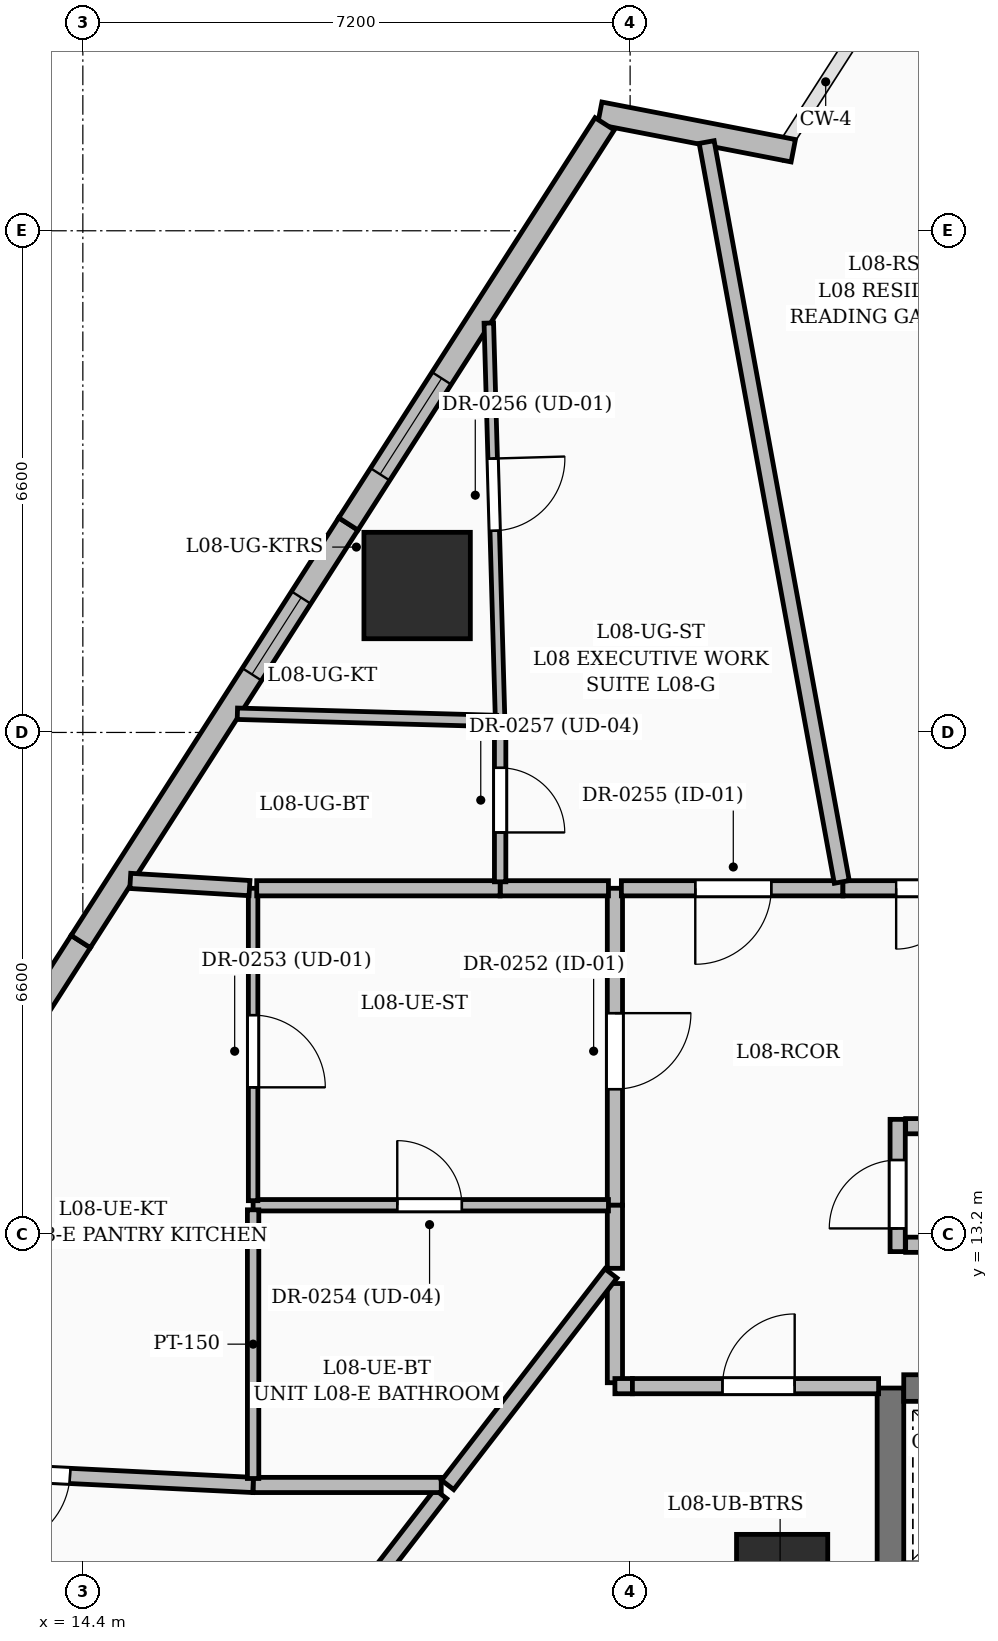
"""IFC4 building model, lengths in metres.
Left out: names, types, materials, properties, quantities, classifications, styles, units other than length and angle.
Written with IfcOpenShell. Run it as: python <this file> out.ifc"""

import sys

from ifc_helpers import new_model, si_unit, direction, frame, frame_2d, origin, origin_2d, place, context, subcontext, project, spatial, rectangle, extrude, element, fill, save


model = new_model("IFC4")
c1 = context("Model", 3, precision=1e-05, world=origin(), true_north=direction((0.0, 1.0)))
c2 = subcontext(c1, "Body", "Model", "MODEL_VIEW")
j1 = project(units=[si_unit("LENGTHUNIT", "METRE"), si_unit("PLANEANGLEUNIT", "RADIAN")], contexts=[c1])
p1 = place(None, origin())
s1 = spatial("IfcSite", under=j1, at=p1, CompositionType="ELEMENT")
p2 = place(p1, origin())
s2 = spatial("IfcBuilding", under=s1, at=p2, CompositionType="ELEMENT")
p3 = place(p2, frame((0.0, 0.0, 39.0)))
s3 = spatial("IfcBuildingStorey", under=s2, at=p3, CompositionType="ELEMENT", Elevation=39.0)
p4 = place(p3, frame((23.6, 8.65, 0.0), z_axis=(0.0, 0.0, 1.0), x_axis=(1.0, 0.0, 0.0)))
e1 = element("IfcColumn", 1, at=p4, inside=s3, PredefinedType="COLUMN", context=c2, shape_type="SweptSolid", body=[
    extrude(rectangle(XDim=1.2, YDim=1.2, at=origin_2d()), origin(), (0.0, 0.0, 1.0), 3.6),
])
p5 = place(p3, frame((25.025, 6.225, 0.0), z_axis=(0.0, 0.0, 1.0), x_axis=(0.0, 1.0, 0.0)))
e2 = element("IfcWall", 2, at=p5, inside=s3, PredefinedType="SOLIDWALL", context=c2, shape_type="SweptSolid", body=[
    extrude(rectangle(XDim=4.95, YDim=0.35, at=frame_2d((2.475, 0.0))), origin(), (0.0, 0.0, 1.0), 3.6),
])
p6 = place(p3, frame((25.2, 11.175, 0.0), z_axis=(0.0, 0.0, 1.0), x_axis=(1.0, 0.0, 0.0)))
e3 = element("IfcWall", 3, at=p6, inside=s3, PredefinedType="SOLIDWALL", context=c2, shape_type="SweptSolid", body=[
    extrude(rectangle(XDim=1.9, YDim=0.35, at=frame_2d((0.95, 0.0))), origin(), (0.0, 0.0, 1.0), 3.6),
])
p7 = place(p3, frame((18.798, 21.733, 0.0), z_axis=(0.0, 0.0, 1.0), x_axis=(1.0, 0.0, 0.0)))
e4 = element("IfcColumn", 4, at=p7, inside=s3, PredefinedType="COLUMN", context=c2, shape_type="SweptSolid", body=[
    extrude(rectangle(XDim=1.4, YDim=1.4, at=origin_2d()), origin(), (0.0, 0.0, 1.0), 3.6),
])
p8 = place(p3, frame((21.201, 27.947, 0.0), z_axis=(0.0, 0.0, 1.0), x_axis=(0.981746971615, -0.190191702567, 0.0)))
e5 = element("IfcWall", 5, at=p8, inside=s3, PredefinedType="SOLIDWALL", context=c2, shape_type="SweptSolid", body=[
    extrude(rectangle(XDim=2.593, YDim=0.3, at=frame_2d((1.296, 0.0))), origin(), (0.0, 0.0, 1.0), 2.375),
])
p9 = place(p3, frame((10.851, 11.555, 0.0), z_axis=(0.0, 0.0, 1.0), x_axis=(0.539526045631, 0.841968910403, 0.0)))
e6 = element("IfcWall", 6, at=p9, inside=s3, PredefinedType="SOLIDWALL", context=c2, shape_type="SweptSolid", body=[
    extrude(rectangle(XDim=6.526, YDim=0.3, at=frame_2d((3.263, 0.0))), origin(), (0.0, 0.0, 1.0), 3.35),
])
p10 = place(p9, frame((2.25, 0.0, 0.6)))
e7 = element("IfcOpeningElement", 7, at=p10, cuts=e6, PredefinedType="OPENING", context=c2, shape_type="SweptSolid", body=[
    extrude(rectangle(XDim=1.8, YDim=2.1, at=frame_2d((0.9, 1.05))), frame((0.0, 0.16, 0.0), z_axis=(0.0, -1.0, 0.0), x_axis=(1.0, 0.0, 0.0)), (0.0, 0.0, 1.0), 0.32),
])
p11 = place(p3, frame((14.372, 17.049, 0.0), z_axis=(0.0, 0.0, 1.0), x_axis=(0.539499522652, 0.841985905498, 0.0)))
e8 = element("IfcWall", 8, at=p11, inside=s3, PredefinedType="SOLIDWALL", context=c2, shape_type="SweptSolid", body=[
    extrude(rectangle(XDim=6.525, YDim=0.3, at=frame_2d((3.263, 0.0))), origin(), (0.0, 0.0, 1.0), 3.35),
])
p12 = place(p11, frame((4.175, 0.0, 0.8)))
e9 = element("IfcOpeningElement", 9, at=p12, cuts=e8, PredefinedType="OPENING", context=c2, shape_type="SweptSolid", body=[
    extrude(rectangle(XDim=1.2, YDim=1.8, at=frame_2d((0.6, 0.9))), frame((0.0, 0.16, 0.0), z_axis=(0.0, -1.0, 0.0), x_axis=(1.0, 0.0, 0.0)), (0.0, 0.0, 1.0), 0.32),
])
p13 = place(p3, frame((17.893, 22.543, 0.0), z_axis=(0.0, 0.0, 1.0), x_axis=(0.539539053693, 0.841960574813, 0.0)))
e10 = element("IfcWall", 10, at=p13, inside=s3, PredefinedType="SOLIDWALL", context=c2, shape_type="SweptSolid", body=[
    extrude(rectangle(XDim=6.251, YDim=0.3, at=frame_2d((3.125, 0.0))), origin(), (0.0, 0.0, 1.0), 3.35),
])
p14 = place(p13, frame((0.775, 0.0, 0.6)))
e11 = element("IfcOpeningElement", 11, at=p14, cuts=e10, PredefinedType="OPENING", context=c2, shape_type="SweptSolid", body=[
    extrude(rectangle(XDim=1.5, YDim=2.1, at=frame_2d((0.75, 1.05))), frame((0.0, 0.16, 0.0), z_axis=(0.0, -1.0, 0.0), x_axis=(1.0, 0.0, 0.0)), (0.0, 0.0, 1.0), 0.32),
])
p15 = place(p3, frame((25.12, 12.97, 0.0), z_axis=(0.0, 0.0, 1.0), x_axis=(0.0, 1.0, 0.0)))
e12 = element("IfcWall", 12, at=p15, inside=s3, PredefinedType="PARTITIONING", context=c2, shape_type="SweptSolid", body=[
    extrude(rectangle(XDim=1.74, YDim=0.2, at=frame_2d((0.87, 0.0))), origin(), (0.0, 0.0, 1.0), 3.35),
])
p16 = place(p15, frame((0.305, 0.0, 0.0)))
e13 = element("IfcOpeningElement", 13, at=p16, cuts=e12, PredefinedType="OPENING", context=c2, shape_type="SweptSolid", body=[
    extrude(rectangle(XDim=0.9, YDim=2.1, at=frame_2d((0.45, 1.05))), frame((0.0, 0.11, 0.0), z_axis=(0.0, -1.0, 0.0), x_axis=(1.0, 0.0, 0.0)), (0.0, 0.0, 1.0), 0.22),
])
for number, where, z_axis, x_axis in (
    (14, (25.225, 14.62, 0.0), (0.0, 0.0, 1.0), (1.0, 0.0, 0.0)),
    (15, (25.225, 13.06, 0.0), (0.0, 0.0, 1.0), (1.0, 0.0, 0.0)),
):
    element("IfcWall", number, at=place(p3, frame(where, z_axis=z_axis, x_axis=x_axis)), inside=s3, PredefinedType="PARTITIONING", context=c2, shape_type="SweptSolid", body=[
        extrude(rectangle(XDim=1.86, YDim=0.2, at=frame_2d((0.93, 0.0))), origin(), (0.0, 0.0, 1.0), 3.35),
    ])
p17 = place(p3, frame((21.4, 12.55, 0.0), z_axis=(0.0, 0.0, 1.0), x_axis=(0.0, -1.0, 0.0)))
e16 = element("IfcWall", 16, at=p17, inside=s3, PredefinedType="PARTITIONING", context=c2, shape_type="SweptSolid", body=[
    extrude(rectangle(XDim=1.305, YDim=0.2, at=frame_2d((0.652, 0.0))), origin(), (0.0, 0.0, 1.0), 3.35),
])
p18 = place(p3, frame((21.4, 11.2, 0.0), z_axis=(0.0, 0.0, 1.0), x_axis=(1.0, 0.0, 0.0)))
e17 = element("IfcWall", 17, at=p18, inside=s3, PredefinedType="PARTITIONING", context=c2, shape_type="SweptSolid", body=[
    extrude(rectangle(XDim=0.23, YDim=0.2, at=frame_2d((0.115, 0.0))), origin(), (0.0, 0.0, 1.0), 2.771),
])
p19 = place(p3, frame((21.63, 11.2, 0.0), z_axis=(0.0, 0.0, 1.0), x_axis=(1.0, 0.0, 0.0)))
e18 = element("IfcWall", 18, at=p19, inside=s3, PredefinedType="PARTITIONING", context=c2, shape_type="SweptSolid", body=[
    extrude(rectangle(XDim=3.239, YDim=0.2, at=frame_2d((1.62, 0.0))), origin(), (0.0, 0.0, 1.0), 2.771),
])
p20 = place(p19, frame((1.185, 0.0, 0.0)))
e19 = element("IfcOpeningElement", 19, at=p20, cuts=e18, PredefinedType="OPENING", context=c2, shape_type="SweptSolid", body=[
    extrude(rectangle(XDim=0.95, YDim=2.2, at=frame_2d((0.475, 1.1))), frame((0.0, 0.11, 0.0), z_axis=(0.0, -1.0, 0.0), x_axis=(1.0, 0.0, 0.0)), (0.0, 0.0, 1.0), 0.22),
])
p21 = place(p3, frame((21.4, 17.75, 0.0), z_axis=(0.0, 0.0, 1.0), x_axis=(0.0, -1.0, 0.0)))
e20 = element("IfcWall", 20, at=p21, inside=s3, PredefinedType="PARTITIONING", context=c2, shape_type="SweptSolid", body=[
    extrude(rectangle(XDim=4.17, YDim=0.2, at=frame_2d((2.085, 0.0))), origin(), (0.0, 0.0, 1.0), 2.771),
])
p22 = place(p21, frame((1.643, 0.0, 0.0)))
e21 = element("IfcOpeningElement", 21, at=p22, cuts=e20, PredefinedType="OPENING", context=c2, shape_type="SweptSolid", body=[
    extrude(rectangle(XDim=1.0, YDim=2.2, at=frame_2d((0.5, 1.1))), frame((0.0, 0.11, 0.0), z_axis=(0.0, -1.0, 0.0), x_axis=(1.0, 0.0, 0.0)), (0.0, 0.0, 1.0), 0.22),
])
p23 = place(p3, frame((21.4, 13.58, 0.0), z_axis=(0.0, 0.0, 1.0), x_axis=(0.0, -1.0, 0.0)))
e22 = element("IfcWall", 22, at=p23, inside=s3, PredefinedType="PARTITIONING", context=c2, shape_type="SweptSolid", body=[
    extrude(rectangle(XDim=0.83, YDim=0.2, at=frame_2d((0.415, 0.0))), origin(), (0.0, 0.0, 1.0), 3.35),
])
p24 = place(p3, frame((24.4, 17.75, 0.0), z_axis=(0.0, 0.0, 1.0), x_axis=(-1.0, 0.0, 0.0)))
e23 = element("IfcWall", 23, at=p24, inside=s3, PredefinedType="PARTITIONING", context=c2, shape_type="SweptSolid", body=[
    extrude(rectangle(XDim=2.915, YDim=0.2, at=frame_2d((1.458, 0.0))), origin(), (0.0, 0.0, 1.0), 2.279),
])
p25 = place(p24, frame((0.943, 0.0, 0.0)))
e24 = element("IfcOpeningElement", 24, at=p25, cuts=e23, PredefinedType="OPENING", context=c2, shape_type="SweptSolid", body=[
    extrude(rectangle(XDim=1.0, YDim=2.2, at=frame_2d((0.5, 1.1))), frame((0.0, 0.11, 0.0), z_axis=(0.0, -1.0, 0.0), x_axis=(1.0, 0.0, 0.0)), (0.0, 0.0, 1.0), 0.22),
])
p26 = place(p3, frame((27.4, 17.75, 0.0), z_axis=(0.0, 0.0, 1.0), x_axis=(-1.0, 0.0, 0.0)))
e25 = element("IfcWall", 25, at=p26, inside=s3, PredefinedType="PARTITIONING", context=c2, shape_type="SweptSolid", body=[
    extrude(rectangle(XDim=3.0, YDim=0.2, at=frame_2d((1.5, 0.0))), origin(), (0.0, 0.0, 1.0), 2.771),
])
p27 = place(p26, frame((0.7, 0.0, 0.0)))
e26 = element("IfcOpeningElement", 26, at=p27, cuts=e25, PredefinedType="OPENING", context=c2, shape_type="SweptSolid", body=[
    extrude(rectangle(XDim=1.6, YDim=2.3, at=frame_2d((0.8, 1.15))), frame((0.0, 0.11, 0.0), z_axis=(0.0, -1.0, 0.0), x_axis=(1.0, 0.0, 0.0)), (0.0, 0.0, 1.0), 0.22),
])
p28 = place(p3, frame((16.279, 6.118, 0.0), z_axis=(0.0, 0.0, 1.0), x_axis=(0.611231323246, 0.791452000745, 0.0)))
e27 = element("IfcWall", 27, at=p28, inside=s3, PredefinedType="PARTITIONING", context=c2, shape_type="SweptSolid", body=[
    extrude(rectangle(XDim=4.629, YDim=0.2, at=frame_2d((2.314, 0.0))), origin(), (0.0, 0.0, 1.0), 2.279),
])
p29 = place(p3, frame((19.115, 9.9, 0.0), z_axis=(0.0, 0.0, 1.0), x_axis=(-1.0, 0.0, 0.0)))
e28 = element("IfcWall", 28, at=p29, inside=s3, PredefinedType="PARTITIONING", context=c2, shape_type="SweptSolid", body=[
    extrude(rectangle(XDim=2.475, YDim=0.2, at=frame_2d((1.238, 0.0))), origin(), (0.0, 0.0, 1.0), 2.279),
])
p30 = place(p3, frame((16.64, 9.9, 0.0), z_axis=(0.0, 0.0, 1.0), x_axis=(-0.998783560552, 0.049309219933, 0.0)))
e29 = element("IfcWall", 29, at=p30, inside=s3, PredefinedType="PARTITIONING", context=c2, shape_type="SweptSolid", body=[
    extrude(rectangle(XDim=6.511, YDim=0.2, at=frame_2d((3.255, 0.0))), origin(), (0.0, 0.0, 1.0), 2.37),
])
p31 = place(p30, frame((2.412, 0.0, 0.0)))
e30 = element("IfcOpeningElement", 30, at=p31, cuts=e29, PredefinedType="OPENING", context=c2, shape_type="SweptSolid", body=[
    extrude(rectangle(XDim=1.0, YDim=2.2, at=frame_2d((0.5, 1.1))), frame((0.0, 0.11, 0.0), z_axis=(0.0, -1.0, 0.0), x_axis=(1.0, 0.0, 0.0)), (0.0, 0.0, 1.0), 0.22),
])
p32 = place(p3, frame((21.348, 12.683, 0.0), z_axis=(0.0, 0.0, 1.0), x_axis=(-0.611075844668, -0.791572051088, 0.0)))
e31 = element("IfcWall", 31, at=p32, inside=s3, PredefinedType="PARTITIONING", context=c2, shape_type="SweptSolid", body=[
    extrude(rectangle(XDim=3.515, YDim=0.2, at=frame_2d((1.758, 0.0))), origin(), (0.0, 0.0, 1.0), 2.279),
])
p33 = place(p3, frame((16.64, 13.58, 0.0), z_axis=(0.0, 0.0, 1.0), x_axis=(1.0, 0.0, 0.0)))
e32 = element("IfcWall", 32, at=p33, inside=s3, PredefinedType="PARTITIONING", context=c2, shape_type="SweptSolid", body=[
    extrude(rectangle(XDim=4.675, YDim=0.15, at=frame_2d((2.337, 0.0))), origin(), (0.0, 0.0, 1.0), 2.771),
])
p34 = place(p33, frame((1.896, 0.0, 0.0)))
e33 = element("IfcOpeningElement", 33, at=p34, cuts=e32, PredefinedType="OPENING", context=c2, shape_type="SweptSolid", body=[
    extrude(rectangle(XDim=0.85, YDim=2.1, at=frame_2d((0.425, 1.05))), frame((0.0, 0.085, 0.0), z_axis=(0.0, -1.0, 0.0), x_axis=(1.0, 0.0, 0.0)), (0.0, 0.0, 1.0), 0.17),
])
p35 = place(p3, frame((16.64, 17.75, 0.0), z_axis=(0.0, 0.0, 1.0), x_axis=(0.0, -1.0, 0.0)))
e34 = element("IfcWall", 34, at=p35, inside=s3, PredefinedType="PARTITIONING", context=c2, shape_type="SweptSolid", body=[
    extrude(rectangle(XDim=4.11, YDim=0.125, at=frame_2d((2.055, 0.0))), origin(), (0.0, 0.0, 1.0), 3.35),
])
p36 = place(p35, frame((1.669, 0.0, 0.0)))
e35 = element("IfcOpeningElement", 35, at=p36, cuts=e34, PredefinedType="OPENING", context=c2, shape_type="SweptSolid", body=[
    extrude(rectangle(XDim=0.95, YDim=2.2, at=frame_2d((0.475, 1.1))), frame((0.0, 0.072, 0.0), z_axis=(0.0, -1.0, 0.0), x_axis=(1.0, 0.0, 0.0)), (0.0, 0.0, 1.0), 0.145),
])
p37 = place(p3, frame((21.315, 17.75, 0.0), z_axis=(0.0, 0.0, 1.0), x_axis=(-1.0, 0.0, 0.0)))
e36 = element("IfcWall", 36, at=p37, inside=s3, PredefinedType="PARTITIONING", context=c2, shape_type="SweptSolid", body=[
    extrude(rectangle(XDim=1.425, YDim=0.2, at=frame_2d((0.712, 0.0))), origin(), (0.0, 0.0, 1.0), 2.771),
])
p38 = place(p3, frame((19.89, 17.75, 0.0), z_axis=(0.0, 0.0, 1.0), x_axis=(-1.0, 0.0, 0.0)))
e37 = element("IfcWall", 37, at=p38, inside=s3, PredefinedType="PARTITIONING", context=c2, shape_type="SweptSolid", body=[
    extrude(rectangle(XDim=3.202, YDim=0.2, at=frame_2d((1.601, 0.0))), origin(), (0.0, 0.0, 1.0), 3.35),
])
p39 = place(p3, frame((16.64, 13.52, 0.0), z_axis=(0.0, 0.0, 1.0), x_axis=(0.0, -1.0, 0.0)))
e38 = element("IfcWall", 38, at=p39, inside=s3, PredefinedType="PARTITIONING", context=c2, shape_type="SweptSolid", body=[
    extrude(rectangle(XDim=3.535, YDim=0.15, at=frame_2d((1.768, 0.0))), origin(), (0.0, 0.0, 1.0), 2.279),
])
p40 = place(p3, frame((16.593, 17.752, 0.0), z_axis=(0.0, 0.0, 1.0), x_axis=(-0.998181550188, 0.060279290502, 0.0)))
e39 = element("IfcWall", 39, at=p40, inside=s3, PredefinedType="PARTITIONING", context=c2, shape_type="SweptSolid", body=[
    extrude(rectangle(XDim=1.572, YDim=0.2, at=frame_2d((0.786, 0.0))), origin(), (0.0, 0.0, 1.0), 2.37),
])
p41 = place(p3, frame((19.741, 25.186, 0.0), z_axis=(0.0, 0.0, 1.0), x_axis=(0.028430709053, -0.999595765689, 0.0)))
e40 = element("IfcWall", 40, at=p41, inside=s3, PredefinedType="PARTITIONING", context=c2, shape_type="SweptSolid", body=[
    extrude(rectangle(XDim=5.238, YDim=0.125, at=frame_2d((2.619, 0.0))), origin(), (0.0, 0.0, 1.0), 2.279),
])
p42 = place(p41, frame((1.784, 0.0, 0.0)))
e41 = element("IfcOpeningElement", 41, at=p42, cuts=e40, PredefinedType="OPENING", context=c2, shape_type="SweptSolid", body=[
    extrude(rectangle(XDim=0.95, YDim=2.2, at=frame_2d((0.475, 1.1))), frame((0.0, 0.072, 0.0), z_axis=(0.0, -1.0, 0.0), x_axis=(1.0, 0.0, 0.0)), (0.0, 0.0, 1.0), 0.145),
])
p43 = place(p3, frame((19.89, 19.95, 0.0), z_axis=(0.0, 0.0, 1.0), x_axis=(0.0, -1.0, 0.0)))
e42 = element("IfcWall", 42, at=p43, inside=s3, PredefinedType="PARTITIONING", context=c2, shape_type="SweptSolid", body=[
    extrude(rectangle(XDim=2.115, YDim=0.15, at=frame_2d((1.058, 0.0))), origin(), (0.0, 0.0, 1.0), 3.35),
])
p44 = place(p43, frame((0.615, 0.0, 0.0)))
e43 = element("IfcOpeningElement", 43, at=p44, cuts=e42, PredefinedType="OPENING", context=c2, shape_type="SweptSolid", body=[
    extrude(rectangle(XDim=0.85, YDim=2.1, at=frame_2d((0.425, 1.05))), frame((0.0, 0.085, 0.0), z_axis=(0.0, -1.0, 0.0), x_axis=(1.0, 0.0, 0.0)), (0.0, 0.0, 1.0), 0.17),
])
p45 = place(p3, frame((24.385, 17.833, 0.0), z_axis=(0.0, 0.0, 1.0), x_axis=(-0.179680097859, 0.98372509495, 0.0)))
e44 = element("IfcWall", 44, at=p45, inside=s3, PredefinedType="PARTITIONING", context=c2, shape_type="SweptSolid", body=[
    extrude(rectangle(XDim=9.895, YDim=0.2, at=frame_2d((4.947, 0.0))), origin(), (0.0, 0.0, 1.0), 2.37),
])
p46 = place(p3, frame((16.433, 20.046, 0.0), z_axis=(0.0, 0.0, 1.0), x_axis=(0.999614255068, -0.027773027638, 0.0)))
e45 = element("IfcWall", 45, at=p46, inside=s3, PredefinedType="PARTITIONING", context=c2, shape_type="SweptSolid", body=[
    extrude(rectangle(XDim=3.411, YDim=0.15, at=frame_2d((1.705, 0.0))), origin(), (0.0, 0.0, 1.0), 2.37),
])
p47 = place(p12, origin())
e46 = element("IfcWindow", 46, at=p47, inside=s3, PartitioningType="SINGLE_PANEL", PredefinedType="WINDOW", context=c2, shape_type="SweptSolid", body=[
    extrude(rectangle(XDim=1.2, YDim=1.8, at=frame_2d((0.6, 0.9))), frame((0.0, 0.03, 0.0), z_axis=(0.0, -1.0, 0.0), x_axis=(1.0, 0.0, 0.0)), (0.0, 0.0, 1.0), 0.06),
])
fill(e9, e46)
p48 = place(p14, origin())
e47 = element("IfcWindow", 47, at=p48, inside=s3, PartitioningType="SINGLE_PANEL", PredefinedType="WINDOW", context=c2, shape_type="SweptSolid", body=[
    extrude(rectangle(XDim=1.5, YDim=2.1, at=frame_2d((0.75, 1.05))), frame((0.0, 0.03, 0.0), z_axis=(0.0, -1.0, 0.0), x_axis=(1.0, 0.0, 0.0)), (0.0, 0.0, 1.0), 0.06),
])
fill(e11, e47)
p49 = place(p16, origin())
e48 = element("IfcDoor", 48, at=p49, inside=s3, OperationType="SINGLE_SWING_LEFT", PredefinedType="DOOR", context=c2, shape_type="SweptSolid", body=[
    extrude(rectangle(XDim=0.9, YDim=2.1, at=frame_2d((0.45, 1.05))), frame((0.0, 0.025, 0.0), z_axis=(0.0, -1.0, 0.0), x_axis=(1.0, 0.0, 0.0)), (0.0, 0.0, 1.0), 0.05),
])
fill(e13, e48)
p50 = place(p27, origin())
e49 = element("IfcDoor", 49, at=p50, inside=s3, OperationType="DOUBLE_DOOR_SINGLE_SWING", PredefinedType="DOOR", context=c2, shape_type="SweptSolid", body=[
    extrude(rectangle(XDim=1.6, YDim=2.3, at=frame_2d((0.8, 1.15))), frame((0.0, 0.025, 0.0), z_axis=(0.0, -1.0, 0.0), x_axis=(1.0, 0.0, 0.0)), (0.0, 0.0, 1.0), 0.05),
])
fill(e26, e49)
p51 = place(p22, origin())
e50 = element("IfcDoor", 50, at=p51, inside=s3, OperationType="SINGLE_SWING_LEFT", PredefinedType="DOOR", context=c2, shape_type="SweptSolid", body=[
    extrude(rectangle(XDim=1.0, YDim=2.2, at=frame_2d((0.5, 1.1))), frame((0.0, 0.025, 0.0), z_axis=(0.0, -1.0, 0.0), x_axis=(1.0, 0.0, 0.0)), (0.0, 0.0, 1.0), 0.05),
])
fill(e21, e50)
p52 = place(p36, origin())
e51 = element("IfcDoor", 51, at=p52, inside=s3, OperationType="SINGLE_SWING_RIGHT", PredefinedType="DOOR", context=c2, shape_type="SweptSolid", body=[
    extrude(rectangle(XDim=0.95, YDim=2.2, at=frame_2d((0.475, 1.1))), frame((0.0, 0.025, 0.0), z_axis=(0.0, -1.0, 0.0), x_axis=(1.0, 0.0, 0.0)), (0.0, 0.0, 1.0), 0.05),
])
fill(e35, e51)
p53 = place(p34, origin())
e52 = element("IfcDoor", 52, at=p53, inside=s3, OperationType="SINGLE_SWING_LEFT", PredefinedType="DOOR", context=c2, shape_type="SweptSolid", body=[
    extrude(rectangle(XDim=0.85, YDim=2.1, at=frame_2d((0.425, 1.05))), frame((0.0, 0.025, 0.0), z_axis=(0.0, -1.0, 0.0), x_axis=(1.0, 0.0, 0.0)), (0.0, 0.0, 1.0), 0.05),
])
fill(e33, e52)
p54 = place(p25, origin())
e53 = element("IfcDoor", 53, at=p54, inside=s3, OperationType="SINGLE_SWING_RIGHT", PredefinedType="DOOR", context=c2, shape_type="SweptSolid", body=[
    extrude(rectangle(XDim=1.0, YDim=2.2, at=frame_2d((0.5, 1.1))), frame((0.0, 0.025, 0.0), z_axis=(0.0, -1.0, 0.0), x_axis=(1.0, 0.0, 0.0)), (0.0, 0.0, 1.0), 0.05),
])
fill(e24, e53)
p55 = place(p42, origin())
e54 = element("IfcDoor", 54, at=p55, inside=s3, OperationType="SINGLE_SWING_LEFT", PredefinedType="DOOR", context=c2, shape_type="SweptSolid", body=[
    extrude(rectangle(XDim=0.95, YDim=2.2, at=frame_2d((0.475, 1.1))), frame((0.0, 0.025, 0.0), z_axis=(0.0, -1.0, 0.0), x_axis=(1.0, 0.0, 0.0)), (0.0, 0.0, 1.0), 0.05),
])
fill(e41, e54)
p56 = place(p44, origin())
e55 = element("IfcDoor", 55, at=p56, inside=s3, OperationType="SINGLE_SWING_RIGHT", PredefinedType="DOOR", context=c2, shape_type="SweptSolid", body=[
    extrude(rectangle(XDim=0.85, YDim=2.1, at=frame_2d((0.425, 1.05))), frame((0.0, 0.025, 0.0), z_axis=(0.0, -1.0, 0.0), x_axis=(1.0, 0.0, 0.0)), (0.0, 0.0, 1.0), 0.05),
])
fill(e43, e55)
p57 = place(p31, origin())
e56 = element("IfcDoor", 56, at=p57, inside=s3, OperationType="SINGLE_SWING_RIGHT", PredefinedType="DOOR", context=c2, shape_type="SweptSolid", body=[
    extrude(rectangle(XDim=1.0, YDim=2.2, at=frame_2d((0.5, 1.1))), frame((0.0, 0.025, 0.0), z_axis=(0.0, -1.0, 0.0), x_axis=(1.0, 0.0, 0.0)), (0.0, 0.0, 1.0), 0.05),
])
fill(e30, e56)
p58 = place(p20, origin())
e57 = element("IfcDoor", 57, at=p58, inside=s3, OperationType="SINGLE_SWING_RIGHT", PredefinedType="DOOR", context=c2, shape_type="SweptSolid", body=[
    extrude(rectangle(XDim=0.95, YDim=2.2, at=frame_2d((0.475, 1.1))), frame((0.0, 0.025, 0.0), z_axis=(0.0, -1.0, 0.0), x_axis=(1.0, 0.0, 0.0)), (0.0, 0.0, 1.0), 0.05),
])
fill(e19, e57)
save(model, sys.argv[1])
